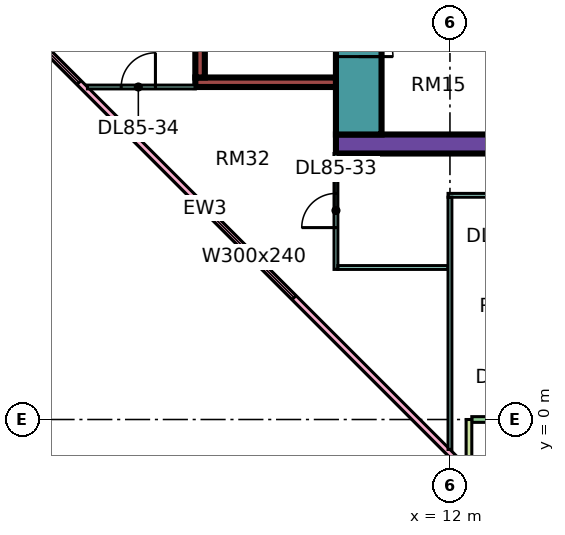
"""IFC4 building model, lengths in metres.
Left out: names, types, materials, properties, quantities, classifications, styles, units other than length and angle.
Written with IfcOpenShell. Run it as: python <this file> out.ifc"""

import sys

from ifc_helpers import new_model, si_unit, direction, frame, frame_2d, origin, place, context, subcontext, project, spatial, rectangle, extrude, element, fill, save


model = new_model("IFC4")
c1 = context("Model", 3, precision=1e-05, world=origin(), true_north=direction((0.0, 1.0)))
c2 = subcontext(c1, "Body", "Model", "MODEL_VIEW")
j1 = project(units=[si_unit("LENGTHUNIT", "METRE"), si_unit("PLANEANGLEUNIT", "RADIAN")], contexts=[c1])
p1 = place(None, origin())
s1 = spatial("IfcSite", under=j1, at=p1, CompositionType="ELEMENT")
p2 = place(p1, origin())
s2 = spatial("IfcBuilding", under=s1, at=p2, CompositionType="ELEMENT")
p3 = place(p2, frame((0.0, 0.0, 365.15)))
s3 = spatial("IfcBuildingStorey", under=s2, at=p3, CompositionType="ELEMENT", Elevation=365.15)
p4 = place(p3, frame((9.0, 7.25, 0.0), z_axis=(0.0, 0.0, 1.0), x_axis=(1.0, 0.0, 0.0)))
e1 = element("IfcWall", 1, at=p4, inside=s3, PredefinedType="SHEAR", context=c2, shape_type="SweptSolid", body=[
    extrude(rectangle(XDim=25.0, YDim=0.5, at=frame_2d((12.5, 0.0))), origin(), (0.0, 0.0, 1.0), 3.75),
])
p5 = place(p3, frame((9.6, 7.5, 0.0), z_axis=(0.0, 0.0, 1.0), x_axis=(0.0, 1.0, 0.0)))
e2 = element("IfcWall", 2, at=p5, inside=s3, PredefinedType="SHEAR", context=c2, shape_type="SweptSolid", body=[
    extrude(rectangle(XDim=12.0, YDim=1.2, at=frame_2d((6.0, 0.0))), origin(), (0.0, 0.0, 1.0), 3.75),
])
p6 = place(p5, frame((4.375, 0.0, 0.0)))
e3 = element("IfcOpeningElement", 3, at=p6, cuts=e2, PredefinedType="OPENING", context=c2, shape_type="SweptSolid", body=[
    extrude(rectangle(XDim=1.1, YDim=2.2, at=frame_2d((0.55, 1.1))), frame((0.0, 0.61, 0.0), z_axis=(0.0, -1.0, 0.0), x_axis=(1.0, 0.0, 0.0)), (0.0, 0.0, 1.0), 1.22),
])
p7 = place(p5, frame((6.875, 0.0, 0.0)))
e4 = element("IfcOpeningElement", 4, at=p7, cuts=e2, PredefinedType="OPENING", context=c2, shape_type="SweptSolid", body=[
    extrude(rectangle(XDim=1.1, YDim=2.2, at=frame_2d((0.55, 1.1))), frame((0.0, 0.61, 0.0), z_axis=(0.0, -1.0, 0.0), x_axis=(1.0, 0.0, 0.0)), (0.0, 0.0, 1.0), 1.22),
])
p8 = place(p5, frame((9.85, 0.0, 0.0)))
e5 = element("IfcOpeningElement", 5, at=p8, cuts=e2, PredefinedType="OPENING", context=c2, shape_type="SweptSolid", body=[
    extrude(rectangle(XDim=1.1, YDim=2.2, at=frame_2d((0.55, 1.1))), frame((0.0, 0.61, 0.0), z_axis=(0.0, -1.0, 0.0), x_axis=(1.0, 0.0, 0.0)), (0.0, 0.0, 1.0), 1.22),
])
p9 = place(p5, frame((2.05, 0.0, 0.0)))
e6 = element("IfcOpeningElement", 6, at=p9, cuts=e2, PredefinedType="OPENING", context=c2, shape_type="SweptSolid", body=[
    extrude(rectangle(XDim=0.9, YDim=2.1, at=frame_2d((0.45, 1.05))), frame((0.0, 0.61, 0.0), z_axis=(0.0, -1.0, 0.0), x_axis=(1.0, 0.0, 0.0)), (0.0, 0.0, 1.0), 1.22),
])
p10 = place(p3, frame((5.3, 8.875, 0.0), z_axis=(0.0, 0.0, 1.0), x_axis=(1.0, 0.0, 0.0)))
e7 = element("IfcWall", 7, at=p10, inside=s3, PredefinedType="SHEAR", context=c2, shape_type="SweptSolid", body=[
    extrude(rectangle(XDim=3.7, YDim=0.25, at=frame_2d((1.85, 0.0))), origin(), (0.0, 0.0, 1.0), 3.75),
])
p11 = place(p3, frame((5.425, 9.0, 0.0), z_axis=(0.0, 0.0, 1.0), x_axis=(0.0, 1.0, 0.0)))
e8 = element("IfcWall", 8, at=p11, inside=s3, PredefinedType="SHEAR", context=c2, shape_type="SweptSolid", body=[
    extrude(rectangle(XDim=4.0, YDim=0.25, at=frame_2d((2.0, 0.0))), origin(), (0.0, 0.0, 1.0), 3.75),
])
p12 = place(p3, frame((-1.447, 12.553, 0.0), z_axis=(0.0, 0.0, 1.0), x_axis=(0.707106781187, -0.707106781187, 0.0)))
e9 = element("IfcWall", 9, at=p12, inside=s3, PredefinedType="SOLIDWALL", context=c2, shape_type="SweptSolid", body=[
    extrude(rectangle(XDim=19.799, YDim=0.15, at=frame_2d((9.899, 0.0))), origin(), (0.0, 0.0, 1.0), 3.35),
])
p13 = place(p12, frame((2.212, 0.0, 0.45)))
e10 = element("IfcOpeningElement", 10, at=p13, cuts=e9, PredefinedType="OPENING", context=c2, shape_type="SweptSolid", body=[
    extrude(rectangle(XDim=3.0, YDim=2.4, at=frame_2d((1.5, 1.2))), frame((0.0, 0.085, 0.0), z_axis=(0.0, -1.0, 0.0), x_axis=(1.0, 0.0, 0.0)), (0.0, 0.0, 1.0), 0.17),
])
p14 = place(p12, frame((10.216, 0.0, 0.45)))
e11 = element("IfcOpeningElement", 11, at=p14, cuts=e9, PredefinedType="OPENING", context=c2, shape_type="SweptSolid", body=[
    extrude(rectangle(XDim=3.0, YDim=2.4, at=frame_2d((1.5, 1.2))), frame((0.0, 0.085, 0.0), z_axis=(0.0, -1.0, 0.0), x_axis=(1.0, 0.0, 0.0)), (0.0, 0.0, 1.0), 0.17),
])
p15 = place(p3, frame((12.575, 0.0, 0.0), z_axis=(0.0, 0.0, 1.0), x_axis=(1.0, 0.0, 0.0)))
e12 = element("IfcWall", 12, at=p15, inside=s3, PredefinedType="SOLIDWALL", context=c2, shape_type="SweptSolid", body=[
    extrude(rectangle(XDim=11.35, YDim=0.15, at=frame_2d((5.675, 0.0))), origin(), (0.0, 0.0, 1.0), 3.35),
])
p16 = place(p15, frame((0.613, 0.0, 0.0)))
e13 = element("IfcOpeningElement", 13, at=p16, cuts=e12, PredefinedType="OPENING", context=c2, shape_type="SweptSolid", body=[
    extrude(rectangle(XDim=1.2, YDim=2.4, at=frame_2d((0.6, 1.2))), frame((0.0, 0.085, 0.0), z_axis=(0.0, -1.0, 0.0), x_axis=(1.0, 0.0, 0.0)), (0.0, 0.0, 1.0), 0.17),
])
p17 = place(p15, frame((5.188, 0.0, 0.45)))
e14 = element("IfcOpeningElement", 14, at=p17, cuts=e12, PredefinedType="OPENING", context=c2, shape_type="SweptSolid", body=[
    extrude(rectangle(XDim=3.0, YDim=2.4, at=frame_2d((1.5, 1.2))), frame((0.0, 0.085, 0.0), z_axis=(0.0, -1.0, 0.0), x_axis=(1.0, 0.0, 0.0)), (0.0, 0.0, 1.0), 0.17),
])
p18 = place(p3, frame((12.5, -1.5, 0.0), z_axis=(0.0, 0.0, 1.0), x_axis=(0.0, 1.0, 0.0)))
e15 = element("IfcWall", 15, at=p18, inside=s3, PredefinedType="SOLIDWALL", context=c2, shape_type="SweptSolid", body=[
    extrude(rectangle(XDim=1.5, YDim=0.15, at=frame_2d((0.75, 0.0))), origin(), (0.0, 0.0, 1.0), 3.35),
])
p19 = place(p3, frame((2.461, 8.75, 0.0), z_axis=(0.0, 0.0, 1.0), x_axis=(1.0, 0.0, 0.0)))
e16 = element("IfcWall", 16, at=p19, inside=s3, PredefinedType="PARTITIONING", context=c2, shape_type="SweptSolid", body=[
    extrude(rectangle(XDim=2.839, YDim=0.1, at=frame_2d((1.419, 0.0))), origin(), (0.0, 0.0, 1.0), 3.35),
])
p20 = place(p19, frame((0.889, 0.0, 0.0)))
e17 = element("IfcOpeningElement", 17, at=p20, cuts=e16, PredefinedType="OPENING", context=c2, shape_type="SweptSolid", body=[
    extrude(rectangle(XDim=0.9, YDim=2.1, at=frame_2d((0.45, 1.05))), frame((0.0, 0.06, 0.0), z_axis=(0.0, -1.0, 0.0), x_axis=(1.0, 0.0, 0.0)), (0.0, 0.0, 1.0), 0.12),
])
p21 = place(p3, frame((9.0, 3.95, 0.0), z_axis=(0.0, 0.0, 1.0), x_axis=(0.0, 1.0, 0.0)))
e18 = element("IfcWall", 18, at=p21, inside=s3, PredefinedType="PARTITIONING", context=c2, shape_type="SweptSolid", body=[
    extrude(rectangle(XDim=3.05, YDim=0.1, at=frame_2d((1.525, 0.0))), origin(), (0.0, 0.0, 1.0), 3.35),
])
p22 = place(p21, frame((1.1, 0.0, 0.0)))
e19 = element("IfcOpeningElement", 19, at=p22, cuts=e18, PredefinedType="OPENING", context=c2, shape_type="SweptSolid", body=[
    extrude(rectangle(XDim=0.9, YDim=2.1, at=frame_2d((0.45, 1.05))), frame((0.0, 0.06, 0.0), z_axis=(0.0, -1.0, 0.0), x_axis=(1.0, 0.0, 0.0)), (0.0, 0.0, 1.0), 0.12),
])
p23 = place(p3, frame((9.05, 4.0, 0.0), z_axis=(0.0, 0.0, 1.0), x_axis=(1.0, 0.0, 0.0)))
e20 = element("IfcWall", 20, at=p23, inside=s3, PredefinedType="PARTITIONING", context=c2, shape_type="SweptSolid", body=[
    extrude(rectangle(XDim=2.9, YDim=0.1, at=frame_2d((1.45, 0.0))), origin(), (0.0, 0.0, 1.0), 3.35),
])
p24 = place(p3, frame((11.95, 5.9, 0.0), z_axis=(0.0, 0.0, 1.0), x_axis=(1.0, 0.0, 0.0)))
e21 = element("IfcWall", 21, at=p24, inside=s3, PredefinedType="PARTITIONING", context=c2, shape_type="SweptSolid", body=[
    extrude(rectangle(XDim=21.1, YDim=0.1, at=frame_2d((10.55, 0.0))), origin(), (0.0, 0.0, 1.0), 3.35),
])
p25 = place(p24, frame((1.1, 0.0, 0.0)))
e22 = element("IfcOpeningElement", 22, at=p25, cuts=e21, PredefinedType="OPENING", context=c2, shape_type="SweptSolid", body=[
    extrude(rectangle(XDim=0.9, YDim=2.1, at=frame_2d((0.45, 1.05))), frame((0.0, 0.06, 0.0), z_axis=(0.0, -1.0, 0.0), x_axis=(1.0, 0.0, 0.0)), (0.0, 0.0, 1.0), 0.12),
])
p26 = place(p24, frame((13.1, 0.0, 0.0)))
e23 = element("IfcOpeningElement", 23, at=p26, cuts=e21, PredefinedType="OPENING", context=c2, shape_type="SweptSolid", body=[
    extrude(rectangle(XDim=0.9, YDim=2.1, at=frame_2d((0.45, 1.05))), frame((0.0, 0.06, 0.0), z_axis=(0.0, -1.0, 0.0), x_axis=(1.0, 0.0, 0.0)), (0.0, 0.0, 1.0), 0.12),
])
p27 = place(p24, frame((16.1, 0.0, 0.0)))
e24 = element("IfcOpeningElement", 24, at=p27, cuts=e21, PredefinedType="OPENING", context=c2, shape_type="SweptSolid", body=[
    extrude(rectangle(XDim=0.9, YDim=2.1, at=frame_2d((0.45, 1.05))), frame((0.0, 0.06, 0.0), z_axis=(0.0, -1.0, 0.0), x_axis=(1.0, 0.0, 0.0)), (0.0, 0.0, 1.0), 0.12),
])
p28 = place(p24, frame((7.1, 0.0, 0.0)))
e25 = element("IfcOpeningElement", 25, at=p28, cuts=e21, PredefinedType="OPENING", context=c2, shape_type="SweptSolid", body=[
    extrude(rectangle(XDim=0.9, YDim=2.1, at=frame_2d((0.45, 1.05))), frame((0.0, 0.06, 0.0), z_axis=(0.0, -1.0, 0.0), x_axis=(1.0, 0.0, 0.0)), (0.0, 0.0, 1.0), 0.12),
])
p29 = place(p3, frame((12.0, -0.788, 0.0), z_axis=(0.0, 0.0, 1.0), x_axis=(0.0, 1.0, 0.0)))
e26 = element("IfcWall", 26, at=p29, inside=s3, PredefinedType="PARTITIONING", context=c2, shape_type="SweptSolid", body=[
    extrude(rectangle(XDim=6.638, YDim=0.1, at=frame_2d((3.319, 0.0))), origin(), (0.0, 0.0, 1.0), 3.35),
])
p30 = place(p13, origin())
e27 = element("IfcWindow", 27, at=p30, inside=s3, PartitioningType="SINGLE_PANEL", PredefinedType="WINDOW", context=c2, shape_type="SweptSolid", body=[
    extrude(rectangle(XDim=3.0, YDim=2.4, at=frame_2d((1.5, 1.2))), frame((0.0, 0.03, 0.0), z_axis=(0.0, -1.0, 0.0), x_axis=(1.0, 0.0, 0.0)), (0.0, 0.0, 1.0), 0.06),
])
fill(e10, e27)
p31 = place(p14, origin())
e28 = element("IfcWindow", 28, at=p31, inside=s3, PartitioningType="SINGLE_PANEL", PredefinedType="WINDOW", context=c2, shape_type="SweptSolid", body=[
    extrude(rectangle(XDim=3.0, YDim=2.4, at=frame_2d((1.5, 1.2))), frame((0.0, 0.03, 0.0), z_axis=(0.0, -1.0, 0.0), x_axis=(1.0, 0.0, 0.0)), (0.0, 0.0, 1.0), 0.06),
])
fill(e11, e28)
p32 = place(p9, frame((0.9, 0.0, 0.0), z_axis=(0.0, 0.0, 1.0), x_axis=(-1.0, 0.0, 0.0)))
e29 = element("IfcDoor", 29, at=p32, inside=s3, OperationType="SINGLE_SWING_LEFT", PredefinedType="DOOR", context=c2, shape_type="SweptSolid", body=[
    extrude(rectangle(XDim=0.9, YDim=2.1, at=frame_2d((0.45, 1.05))), frame((0.0, 0.025, 0.0), z_axis=(0.0, -1.0, 0.0), x_axis=(1.0, 0.0, 0.0)), (0.0, 0.0, 1.0), 0.05),
])
fill(e6, e29)
p33 = place(p22, origin())
e30 = element("IfcDoor", 30, at=p33, inside=s3, OperationType="SINGLE_SWING_LEFT", PredefinedType="DOOR", context=c2, shape_type="SweptSolid", body=[
    extrude(rectangle(XDim=0.9, YDim=2.1, at=frame_2d((0.45, 1.05))), frame((0.0, 0.025, 0.0), z_axis=(0.0, -1.0, 0.0), x_axis=(1.0, 0.0, 0.0)), (0.0, 0.0, 1.0), 0.05),
])
fill(e19, e30)
p34 = place(p20, frame((0.9, 0.0, 0.0), z_axis=(0.0, 0.0, 1.0), x_axis=(-1.0, 0.0, 0.0)))
e31 = element("IfcDoor", 31, at=p34, inside=s3, OperationType="SINGLE_SWING_RIGHT", PredefinedType="DOOR", context=c2, shape_type="SweptSolid", body=[
    extrude(rectangle(XDim=0.9, YDim=2.1, at=frame_2d((0.45, 1.05))), frame((0.0, 0.025, 0.0), z_axis=(0.0, -1.0, 0.0), x_axis=(1.0, 0.0, 0.0)), (0.0, 0.0, 1.0), 0.05),
])
fill(e17, e31)
save(model, sys.argv[1])
